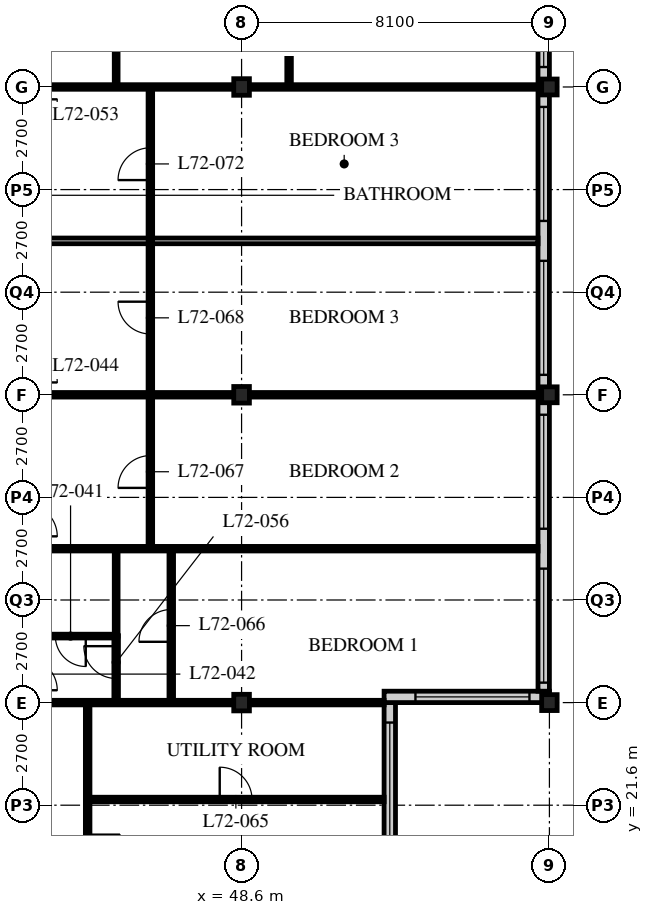
"""IFC4 building model, lengths in metres.
Left out: names, types, materials, properties, quantities, classifications, styles, units other than length and angle.
Written with IfcOpenShell. Run it as: python <this file> out.ifc"""

import sys

from ifc_helpers import new_model, si_unit, direction, frame, frame_2d, origin, origin_2d, place, context, subcontext, project, spatial, rectangle, i_section, extrude, element, fill, save


model = new_model("IFC4")
c1 = context("Model", 3, precision=1e-05, world=origin(), true_north=direction((0.0, 1.0)))
c2 = subcontext(c1, "Body", "Model", "MODEL_VIEW")
j1 = project(units=[si_unit("LENGTHUNIT", "METRE"), si_unit("PLANEANGLEUNIT", "RADIAN")], contexts=[c1])
p1 = place(None, origin())
s1 = spatial("IfcSite", under=j1, at=p1, CompositionType="ELEMENT")
p2 = place(p1, origin())
s2 = spatial("IfcBuilding", under=s1, at=p2, CompositionType="ELEMENT")
p3 = place(p2, frame((0.0, 0.0, 281.4)))
s3 = spatial("IfcBuildingStorey", under=s2, at=p3, CompositionType="ELEMENT", Elevation=281.4)
for number, where, z_axis, x_axis in (
    (1, (48.6, 24.3, 0.0), (0.0, 0.0, 1.0), (1.0, 0.0, 0.0)),
    (2, (48.6, 32.4, 0.0), (0.0, 0.0, 1.0), (1.0, 0.0, 0.0)),
    (3, (48.6, 40.5, 0.0), (0.0, 0.0, 1.0), (1.0, 0.0, 0.0)),
):
    element("IfcColumn", number, at=place(p3, frame(where, z_axis=z_axis, x_axis=x_axis)), inside=s3, PredefinedType="COLUMN", context=c2, shape_type="SweptSolid", body=[
        extrude(i_section(OverallWidth=0.412, OverallDepth=0.437, WebThickness=0.036, FlangeThickness=0.058, FilletRadius=0.015, at=origin_2d()), origin(), (0.0, 0.0, 1.0), 3.9),
    ])
for number, where, z_axis, x_axis in (
    (4, (56.7, 24.3, 0.0), (0.0, 0.0, 1.0), (1.0, 0.0, 0.0)),
    (5, (56.7, 32.4, 0.0), (0.0, 0.0, 1.0), (1.0, 0.0, 0.0)),
    (6, (56.7, 40.5, 0.0), (0.0, 0.0, 1.0), (1.0, 0.0, 0.0)),
):
    element("IfcColumn", number, at=place(p3, frame(where, z_axis=z_axis, x_axis=x_axis)), inside=s3, PredefinedType="COLUMN", context=c2, shape_type="SweptSolid", body=[
        extrude(i_section(OverallWidth=0.407, OverallDepth=0.419, WebThickness=0.031, FlangeThickness=0.049, FilletRadius=0.015, at=origin_2d()), origin(), (0.0, 0.0, 1.0), 3.9),
    ])
p4 = place(p3, frame((52.5, 20.55, 0.0), z_axis=(0.0, 0.0, 1.0), x_axis=(0.0, 1.0, 0.0)))
e7 = element("IfcWall", 7, at=p4, inside=s3, PredefinedType="SOLIDWALL", context=c2, shape_type="SweptSolid", body=[
    extrude(rectangle(XDim=3.75, YDim=0.3, at=frame_2d((1.875, 0.0))), origin(), (0.0, 0.0, 1.0), 3.69),
])
p5 = place(p4, frame((0.225, 0.0, 0.6)))
e8 = element("IfcOpeningElement", 8, at=p5, cuts=e7, PredefinedType="OPENING", context=c2, shape_type="SweptSolid", body=[
    extrude(rectangle(XDim=3.0, YDim=2.3, at=frame_2d((1.5, 1.15))), frame((0.0, 0.16, 0.0), z_axis=(0.0, -1.0, 0.0), x_axis=(1.0, 0.0, 0.0)), (0.0, 0.0, 1.0), 0.32),
])
p6 = place(p3, frame((52.35, 24.45, 0.0), z_axis=(0.0, 0.0, 1.0), x_axis=(1.0, 0.0, 0.0)))
e9 = element("IfcWall", 9, at=p6, inside=s3, PredefinedType="SOLIDWALL", context=c2, shape_type="SweptSolid", body=[
    extrude(rectangle(XDim=4.35, YDim=0.3, at=frame_2d((2.175, 0.0))), origin(), (0.0, 0.0, 1.0), 3.69),
])
p7 = place(p6, frame((0.825, 0.0, 0.6)))
e10 = element("IfcOpeningElement", 10, at=p7, cuts=e9, PredefinedType="OPENING", context=c2, shape_type="SweptSolid", body=[
    extrude(rectangle(XDim=3.0, YDim=2.3, at=frame_2d((1.5, 1.15))), frame((0.0, 0.16, 0.0), z_axis=(0.0, -1.0, 0.0), x_axis=(1.0, 0.0, 0.0)), (0.0, 0.0, 1.0), 0.32),
])
p8 = place(p3, frame((56.55, 24.6, 0.0), z_axis=(0.0, 0.0, 1.0), x_axis=(0.0, 1.0, 0.0)))
e11 = element("IfcWall", 11, at=p8, inside=s3, PredefinedType="SOLIDWALL", context=c2, shape_type="SweptSolid", body=[
    extrude(rectangle(XDim=32.1, YDim=0.3, at=frame_2d((16.05, 0.0))), origin(), (0.0, 0.0, 1.0), 3.69),
])
p9 = place(p8, frame((0.225, 0.0, 0.6)))
e12 = element("IfcOpeningElement", 12, at=p9, cuts=e11, PredefinedType="OPENING", context=c2, shape_type="SweptSolid", body=[
    extrude(rectangle(XDim=3.0, YDim=2.4, at=frame_2d((1.5, 1.2))), frame((0.0, 0.16, 0.0), z_axis=(0.0, -1.0, 0.0), x_axis=(1.0, 0.0, 0.0)), (0.0, 0.0, 1.0), 0.32),
])
p10 = place(p8, frame((4.275, 0.0, 0.6)))
e13 = element("IfcOpeningElement", 13, at=p10, cuts=e11, PredefinedType="OPENING", context=c2, shape_type="SweptSolid", body=[
    extrude(rectangle(XDim=3.0, YDim=2.4, at=frame_2d((1.5, 1.2))), frame((0.0, 0.16, 0.0), z_axis=(0.0, -1.0, 0.0), x_axis=(1.0, 0.0, 0.0)), (0.0, 0.0, 1.0), 0.32),
])
p11 = place(p8, frame((8.325, 0.0, 0.6)))
e14 = element("IfcOpeningElement", 14, at=p11, cuts=e11, PredefinedType="OPENING", context=c2, shape_type="SweptSolid", body=[
    extrude(rectangle(XDim=3.0, YDim=2.4, at=frame_2d((1.5, 1.2))), frame((0.0, 0.16, 0.0), z_axis=(0.0, -1.0, 0.0), x_axis=(1.0, 0.0, 0.0)), (0.0, 0.0, 1.0), 0.32),
])
p12 = place(p8, frame((12.375, 0.0, 0.6)))
e15 = element("IfcOpeningElement", 15, at=p12, cuts=e11, PredefinedType="OPENING", context=c2, shape_type="SweptSolid", body=[
    extrude(rectangle(XDim=3.0, YDim=2.4, at=frame_2d((1.5, 1.2))), frame((0.0, 0.16, 0.0), z_axis=(0.0, -1.0, 0.0), x_axis=(1.0, 0.0, 0.0)), (0.0, 0.0, 1.0), 0.32),
])
p13 = place(p8, frame((16.425, 0.0, 0.6)))
e16 = element("IfcOpeningElement", 16, at=p13, cuts=e11, PredefinedType="OPENING", context=c2, shape_type="SweptSolid", body=[
    extrude(rectangle(XDim=3.0, YDim=2.4, at=frame_2d((1.5, 1.2))), frame((0.0, 0.16, 0.0), z_axis=(0.0, -1.0, 0.0), x_axis=(1.0, 0.0, 0.0)), (0.0, 0.0, 1.0), 0.32),
])
p14 = place(p8, frame((20.475, 0.0, 0.6)))
e17 = element("IfcOpeningElement", 17, at=p14, cuts=e11, PredefinedType="OPENING", context=c2, shape_type="SweptSolid", body=[
    extrude(rectangle(XDim=3.0, YDim=2.4, at=frame_2d((1.5, 1.2))), frame((0.0, 0.16, 0.0), z_axis=(0.0, -1.0, 0.0), x_axis=(1.0, 0.0, 0.0)), (0.0, 0.0, 1.0), 0.32),
])
p15 = place(p8, frame((24.525, 0.0, 0.6)))
e18 = element("IfcOpeningElement", 18, at=p15, cuts=e11, PredefinedType="OPENING", context=c2, shape_type="SweptSolid", body=[
    extrude(rectangle(XDim=3.0, YDim=2.4, at=frame_2d((1.5, 1.2))), frame((0.0, 0.16, 0.0), z_axis=(0.0, -1.0, 0.0), x_axis=(1.0, 0.0, 0.0)), (0.0, 0.0, 1.0), 0.32),
])
p16 = place(p8, frame((28.575, 0.0, 0.6)))
e19 = element("IfcOpeningElement", 19, at=p16, cuts=e11, PredefinedType="OPENING", context=c2, shape_type="SweptSolid", body=[
    extrude(rectangle(XDim=3.0, YDim=2.4, at=frame_2d((1.5, 1.2))), frame((0.0, 0.16, 0.0), z_axis=(0.0, -1.0, 0.0), x_axis=(1.0, 0.0, 0.0)), (0.0, 0.0, 1.0), 0.32),
])
p17 = place(p3, frame((42.9, 24.3, 0.0), z_axis=(0.0, 0.0, 1.0), x_axis=(1.0, 0.0, 0.0)))
e20 = element("IfcWall", 20, at=p17, inside=s3, PredefinedType="PARTITIONING", context=c2, shape_type="SweptSolid", body=[
    extrude(rectangle(XDim=9.45, YDim=0.12, at=frame_2d((4.725, 0.0))), origin(), (0.0, 0.0, 1.0), 3.078),
])
p18 = place(p3, frame((40.5, 36.45, 0.0), z_axis=(0.0, 0.0, 1.0), x_axis=(1.0, 0.0, 0.0)))
e21 = element("IfcWall", 21, at=p18, inside=s3, PredefinedType="PARTITIONING", context=c2, shape_type="SweptSolid", body=[
    extrude(rectangle(XDim=15.9, YDim=0.15, at=frame_2d((7.95, 0.0))), origin(), (0.0, 0.0, 1.0), 3.69),
])
p19 = place(p3, frame((44.55, 16.5, 0.0), z_axis=(0.0, 0.0, 1.0), x_axis=(0.0, 1.0, 0.0)))
e22 = element("IfcWall", 22, at=p19, inside=s3, PredefinedType="PARTITIONING", context=c2, shape_type="SweptSolid", body=[
    extrude(rectangle(XDim=7.8, YDim=0.12, at=frame_2d((3.9, 0.0))), origin(), (0.0, 0.0, 1.0), 3.69),
])
p20 = place(p19, frame((3.475, 0.0, 0.0)))
e23 = element("IfcOpeningElement", 23, at=p20, cuts=e22, PredefinedType="OPENING", context=c2, shape_type="SweptSolid", body=[
    extrude(rectangle(XDim=0.85, YDim=2.1, at=frame_2d((0.425, 1.05))), frame((0.0, 0.07, 0.0), z_axis=(0.0, -1.0, 0.0), x_axis=(1.0, 0.0, 0.0)), (0.0, 0.0, 1.0), 0.14),
])
p21 = place(p3, frame((42.9, 26.05, 0.0), z_axis=(0.0, 0.0, 1.0), x_axis=(1.0, 0.0, 0.0)))
e24 = element("IfcWall", 24, at=p21, inside=s3, PredefinedType="PARTITIONING", context=c2, shape_type="SweptSolid", body=[
    extrude(rectangle(XDim=2.4, YDim=0.1, at=frame_2d((1.2, 0.0))), origin(), (0.0, 0.0, 1.0), 3.69),
])
p22 = place(p21, frame((0.8, 0.0, 0.0)))
e25 = element("IfcOpeningElement", 25, at=p22, cuts=e24, PredefinedType="OPENING", context=c2, shape_type="SweptSolid", body=[
    extrude(rectangle(XDim=0.8, YDim=2.1, at=frame_2d((0.4, 1.05))), frame((0.0, 0.06, 0.0), z_axis=(0.0, -1.0, 0.0), x_axis=(1.0, 0.0, 0.0)), (0.0, 0.0, 1.0), 0.12),
])
p23 = place(p3, frame((45.3, 26.05, 0.0), z_axis=(0.0, 0.0, 1.0), x_axis=(0.0, 1.0, 0.0)))
e26 = element("IfcWall", 26, at=p23, inside=s3, PredefinedType="PARTITIONING", context=c2, shape_type="SweptSolid", body=[
    extrude(rectangle(XDim=2.3, YDim=0.1, at=frame_2d((1.15, 0.0))), origin(), (0.0, 0.0, 1.0), 3.69),
])
p24 = place(p3, frame((42.9, 28.35, 0.0), z_axis=(0.0, 0.0, 1.0), x_axis=(1.0, 0.0, 0.0)))
e27 = element("IfcWall", 27, at=p24, inside=s3, PredefinedType="PARTITIONING", context=c2, shape_type="SweptSolid", body=[
    extrude(rectangle(XDim=13.5, YDim=0.12, at=frame_2d((6.75, 0.0))), origin(), (0.0, 0.0, 1.0), 3.69),
])
p25 = place(p3, frame((42.9, 32.4, 0.0), z_axis=(0.0, 0.0, 1.0), x_axis=(1.0, 0.0, 0.0)))
e28 = element("IfcWall", 28, at=p25, inside=s3, PredefinedType="PARTITIONING", context=c2, shape_type="SweptSolid", body=[
    extrude(rectangle(XDim=13.5, YDim=0.12, at=frame_2d((6.75, 0.0))), origin(), (0.0, 0.0, 1.0), 3.078),
])
p26 = place(p3, frame((45.3, 42.8, 0.0), z_axis=(0.0, 0.0, 1.0), x_axis=(0.0, -1.0, 0.0)))
e29 = element("IfcWall", 29, at=p26, inside=s3, PredefinedType="PARTITIONING", context=c2, shape_type="SweptSolid", body=[
    extrude(rectangle(XDim=2.3, YDim=0.1, at=frame_2d((1.15, 0.0))), origin(), (0.0, 0.0, 1.0), 3.69),
])
p27 = place(p3, frame((42.9, 40.5, 0.0), z_axis=(0.0, 0.0, 1.0), x_axis=(1.0, 0.0, 0.0)))
e30 = element("IfcWall", 30, at=p27, inside=s3, PredefinedType="PARTITIONING", context=c2, shape_type="SweptSolid", body=[
    extrude(rectangle(XDim=13.5, YDim=0.12, at=frame_2d((6.75, 0.0))), origin(), (0.0, 0.0, 1.0), 3.078),
])
p28 = place(p3, frame((45.3, 24.3, 0.0), z_axis=(0.0, 0.0, 1.0), x_axis=(0.0, 1.0, 0.0)))
e31 = element("IfcWall", 31, at=p28, inside=s3, PredefinedType="PARTITIONING", context=c2, shape_type="SweptSolid", body=[
    extrude(rectangle(XDim=1.76, YDim=0.12, at=frame_2d((0.88, 0.0))), origin(), (0.0, 0.0, 1.0), 3.69),
])
p29 = place(p28, frame((0.635, 0.0, 0.0)))
e32 = element("IfcOpeningElement", 32, at=p29, cuts=e31, PredefinedType="OPENING", context=c2, shape_type="SweptSolid", body=[
    extrude(rectangle(XDim=0.85, YDim=2.1, at=frame_2d((0.425, 1.05))), frame((0.0, 0.07, 0.0), z_axis=(0.0, -1.0, 0.0), x_axis=(1.0, 0.0, 0.0)), (0.0, 0.0, 1.0), 0.14),
])
p30 = place(p3, frame((44.55, 21.75, 0.0), z_axis=(0.0, 0.0, 1.0), x_axis=(1.0, 0.0, 0.0)))
e33 = element("IfcWall", 33, at=p30, inside=s3, PredefinedType="PARTITIONING", context=c2, shape_type="SweptSolid", body=[
    extrude(rectangle(XDim=7.8, YDim=0.12, at=frame_2d((3.9, 0.0))), origin(), (0.0, 0.0, 1.0), 3.69),
])
p31 = place(p30, frame((3.475, 0.0, 0.0)))
e34 = element("IfcOpeningElement", 34, at=p31, cuts=e33, PredefinedType="OPENING", context=c2, shape_type="SweptSolid", body=[
    extrude(rectangle(XDim=0.85, YDim=2.1, at=frame_2d((0.425, 1.05))), frame((0.0, 0.07, 0.0), z_axis=(0.0, -1.0, 0.0), x_axis=(1.0, 0.0, 0.0)), (0.0, 0.0, 1.0), 0.14),
])
p32 = place(p3, frame((46.75, 24.3, 0.0), z_axis=(0.0, 0.0, 1.0), x_axis=(0.0, 1.0, 0.0)))
e35 = element("IfcWall", 35, at=p32, inside=s3, PredefinedType="PARTITIONING", context=c2, shape_type="SweptSolid", body=[
    extrude(rectangle(XDim=4.05, YDim=0.12, at=frame_2d((2.025, 0.0))), origin(), (0.0, 0.0, 1.0), 3.69),
])
p33 = place(p32, frame((1.6, 0.0, 0.0)))
e36 = element("IfcOpeningElement", 36, at=p33, cuts=e35, PredefinedType="OPENING", context=c2, shape_type="SweptSolid", body=[
    extrude(rectangle(XDim=0.85, YDim=2.1, at=frame_2d((0.425, 1.05))), frame((0.0, 0.07, 0.0), z_axis=(0.0, -1.0, 0.0), x_axis=(1.0, 0.0, 0.0)), (0.0, 0.0, 1.0), 0.14),
])
p34 = place(p3, frame((46.2, 28.35, 0.0), z_axis=(0.0, 0.0, 1.0), x_axis=(0.0, 1.0, 0.0)))
e37 = element("IfcWall", 37, at=p34, inside=s3, PredefinedType="PARTITIONING", context=c2, shape_type="SweptSolid", body=[
    extrude(rectangle(XDim=12.15, YDim=0.12, at=frame_2d((6.075, 0.0))), origin(), (0.0, 0.0, 1.0), 3.69),
])
p35 = place(p34, frame((1.6, 0.0, 0.0)))
e38 = element("IfcOpeningElement", 38, at=p35, cuts=e37, PredefinedType="OPENING", context=c2, shape_type="SweptSolid", body=[
    extrude(rectangle(XDim=0.85, YDim=2.1, at=frame_2d((0.425, 1.05))), frame((0.0, 0.07, 0.0), z_axis=(0.0, -1.0, 0.0), x_axis=(1.0, 0.0, 0.0)), (0.0, 0.0, 1.0), 0.14),
])
p36 = place(p34, frame((5.65, 0.0, 0.0)))
e39 = element("IfcOpeningElement", 39, at=p36, cuts=e37, PredefinedType="OPENING", context=c2, shape_type="SweptSolid", body=[
    extrude(rectangle(XDim=0.85, YDim=2.1, at=frame_2d((0.425, 1.05))), frame((0.0, 0.07, 0.0), z_axis=(0.0, -1.0, 0.0), x_axis=(1.0, 0.0, 0.0)), (0.0, 0.0, 1.0), 0.14),
])
p37 = place(p34, frame((9.7, 0.0, 0.0)))
e40 = element("IfcOpeningElement", 40, at=p37, cuts=e37, PredefinedType="OPENING", context=c2, shape_type="SweptSolid", body=[
    extrude(rectangle(XDim=0.85, YDim=2.1, at=frame_2d((0.425, 1.05))), frame((0.0, 0.07, 0.0), z_axis=(0.0, -1.0, 0.0), x_axis=(1.0, 0.0, 0.0)), (0.0, 0.0, 1.0), 0.14),
])
p38 = place(p3, frame((49.85, 40.5, 0.0), z_axis=(0.0, 0.0, 1.0), x_axis=(0.0, 1.0, 0.0)))
e41 = element("IfcWall", 41, at=p38, inside=s3, PredefinedType="PARTITIONING", context=c2, shape_type="SweptSolid", body=[
    extrude(rectangle(XDim=6.3, YDim=0.12, at=frame_2d((3.15, 0.0))), origin(), (0.0, 0.0, 1.0), 3.69),
])
p39 = place(p38, frame((2.725, 0.0, 0.0)))
e42 = element("IfcOpeningElement", 42, at=p39, cuts=e41, PredefinedType="OPENING", context=c2, shape_type="SweptSolid", body=[
    extrude(rectangle(XDim=0.85, YDim=2.1, at=frame_2d((0.425, 1.05))), frame((0.0, 0.07, 0.0), z_axis=(0.0, -1.0, 0.0), x_axis=(1.0, 0.0, 0.0)), (0.0, 0.0, 1.0), 0.14),
])
p40 = place(p5, origin())
e43 = element("IfcWindow", 43, at=p40, inside=s3, PartitioningType="SINGLE_PANEL", PredefinedType="WINDOW", context=c2, shape_type="SweptSolid", body=[
    extrude(rectangle(XDim=3.0, YDim=2.3, at=frame_2d((1.5, 1.15))), frame((0.0, 0.03, 0.0), z_axis=(0.0, -1.0, 0.0), x_axis=(1.0, 0.0, 0.0)), (0.0, 0.0, 1.0), 0.06),
])
fill(e8, e43)
p41 = place(p7, origin())
e44 = element("IfcWindow", 44, at=p41, inside=s3, PartitioningType="SINGLE_PANEL", PredefinedType="WINDOW", context=c2, shape_type="SweptSolid", body=[
    extrude(rectangle(XDim=3.0, YDim=2.3, at=frame_2d((1.5, 1.15))), frame((0.0, 0.03, 0.0), z_axis=(0.0, -1.0, 0.0), x_axis=(1.0, 0.0, 0.0)), (0.0, 0.0, 1.0), 0.06),
])
fill(e10, e44)
p42 = place(p9, origin())
e45 = element("IfcWindow", 45, at=p42, inside=s3, PartitioningType="SINGLE_PANEL", PredefinedType="WINDOW", context=c2, shape_type="SweptSolid", body=[
    extrude(rectangle(XDim=3.0, YDim=2.4, at=frame_2d((1.5, 1.2))), frame((0.0, 0.03, 0.0), z_axis=(0.0, -1.0, 0.0), x_axis=(1.0, 0.0, 0.0)), (0.0, 0.0, 1.0), 0.06),
])
fill(e12, e45)
p43 = place(p10, origin())
e46 = element("IfcWindow", 46, at=p43, inside=s3, PartitioningType="SINGLE_PANEL", PredefinedType="WINDOW", context=c2, shape_type="SweptSolid", body=[
    extrude(rectangle(XDim=3.0, YDim=2.4, at=frame_2d((1.5, 1.2))), frame((0.0, 0.03, 0.0), z_axis=(0.0, -1.0, 0.0), x_axis=(1.0, 0.0, 0.0)), (0.0, 0.0, 1.0), 0.06),
])
fill(e13, e46)
p44 = place(p11, origin())
e47 = element("IfcWindow", 47, at=p44, inside=s3, PartitioningType="SINGLE_PANEL", PredefinedType="WINDOW", context=c2, shape_type="SweptSolid", body=[
    extrude(rectangle(XDim=3.0, YDim=2.4, at=frame_2d((1.5, 1.2))), frame((0.0, 0.03, 0.0), z_axis=(0.0, -1.0, 0.0), x_axis=(1.0, 0.0, 0.0)), (0.0, 0.0, 1.0), 0.06),
])
fill(e14, e47)
p45 = place(p12, origin())
e48 = element("IfcWindow", 48, at=p45, inside=s3, PartitioningType="SINGLE_PANEL", PredefinedType="WINDOW", context=c2, shape_type="SweptSolid", body=[
    extrude(rectangle(XDim=3.0, YDim=2.4, at=frame_2d((1.5, 1.2))), frame((0.0, 0.03, 0.0), z_axis=(0.0, -1.0, 0.0), x_axis=(1.0, 0.0, 0.0)), (0.0, 0.0, 1.0), 0.06),
])
fill(e15, e48)
p46 = place(p13, origin())
e49 = element("IfcWindow", 49, at=p46, inside=s3, PartitioningType="SINGLE_PANEL", PredefinedType="WINDOW", context=c2, shape_type="SweptSolid", body=[
    extrude(rectangle(XDim=3.0, YDim=2.4, at=frame_2d((1.5, 1.2))), frame((0.0, 0.03, 0.0), z_axis=(0.0, -1.0, 0.0), x_axis=(1.0, 0.0, 0.0)), (0.0, 0.0, 1.0), 0.06),
])
fill(e16, e49)
p47 = place(p20, origin())
e50 = element("IfcDoor", 50, at=p47, inside=s3, OperationType="SINGLE_SWING_LEFT", PredefinedType="DOOR", context=c2, shape_type="SweptSolid", body=[
    extrude(rectangle(XDim=0.85, YDim=2.1, at=frame_2d((0.425, 1.05))), frame((0.0, 0.025, 0.0), z_axis=(0.0, -1.0, 0.0), x_axis=(1.0, 0.0, 0.0)), (0.0, 0.0, 1.0), 0.05),
])
fill(e23, e50)
p48 = place(p22, origin())
e51 = element("IfcDoor", 51, at=p48, inside=s3, OperationType="SINGLE_SWING_LEFT", PredefinedType="DOOR", context=c2, shape_type="SweptSolid", body=[
    extrude(rectangle(XDim=0.8, YDim=2.1, at=frame_2d((0.4, 1.05))), frame((0.0, 0.025, 0.0), z_axis=(0.0, -1.0, 0.0), x_axis=(1.0, 0.0, 0.0)), (0.0, 0.0, 1.0), 0.05),
])
fill(e25, e51)
p49 = place(p29, origin())
e52 = element("IfcDoor", 52, at=p49, inside=s3, OperationType="SINGLE_SWING_RIGHT", PredefinedType="DOOR", context=c2, shape_type="SweptSolid", body=[
    extrude(rectangle(XDim=0.85, YDim=2.1, at=frame_2d((0.425, 1.05))), frame((0.0, 0.025, 0.0), z_axis=(0.0, -1.0, 0.0), x_axis=(1.0, 0.0, 0.0)), (0.0, 0.0, 1.0), 0.05),
])
fill(e32, e52)
p50 = place(p31, origin())
e53 = element("IfcDoor", 53, at=p50, inside=s3, OperationType="SINGLE_SWING_LEFT", PredefinedType="DOOR", context=c2, shape_type="SweptSolid", body=[
    extrude(rectangle(XDim=0.85, YDim=2.1, at=frame_2d((0.425, 1.05))), frame((0.0, 0.025, 0.0), z_axis=(0.0, -1.0, 0.0), x_axis=(1.0, 0.0, 0.0)), (0.0, 0.0, 1.0), 0.05),
])
fill(e34, e53)
p51 = place(p33, origin())
e54 = element("IfcDoor", 54, at=p51, inside=s3, OperationType="SINGLE_SWING_LEFT", PredefinedType="DOOR", context=c2, shape_type="SweptSolid", body=[
    extrude(rectangle(XDim=0.85, YDim=2.1, at=frame_2d((0.425, 1.05))), frame((0.0, 0.025, 0.0), z_axis=(0.0, -1.0, 0.0), x_axis=(1.0, 0.0, 0.0)), (0.0, 0.0, 1.0), 0.05),
])
fill(e36, e54)
p52 = place(p35, origin())
e55 = element("IfcDoor", 55, at=p52, inside=s3, OperationType="SINGLE_SWING_LEFT", PredefinedType="DOOR", context=c2, shape_type="SweptSolid", body=[
    extrude(rectangle(XDim=0.85, YDim=2.1, at=frame_2d((0.425, 1.05))), frame((0.0, 0.025, 0.0), z_axis=(0.0, -1.0, 0.0), x_axis=(1.0, 0.0, 0.0)), (0.0, 0.0, 1.0), 0.05),
])
fill(e38, e55)
p53 = place(p36, origin())
e56 = element("IfcDoor", 56, at=p53, inside=s3, OperationType="SINGLE_SWING_RIGHT", PredefinedType="DOOR", context=c2, shape_type="SweptSolid", body=[
    extrude(rectangle(XDim=0.85, YDim=2.1, at=frame_2d((0.425, 1.05))), frame((0.0, 0.025, 0.0), z_axis=(0.0, -1.0, 0.0), x_axis=(1.0, 0.0, 0.0)), (0.0, 0.0, 1.0), 0.05),
])
fill(e39, e56)
p54 = place(p37, origin())
e57 = element("IfcDoor", 57, at=p54, inside=s3, OperationType="SINGLE_SWING_LEFT", PredefinedType="DOOR", context=c2, shape_type="SweptSolid", body=[
    extrude(rectangle(XDim=0.85, YDim=2.1, at=frame_2d((0.425, 1.05))), frame((0.0, 0.025, 0.0), z_axis=(0.0, -1.0, 0.0), x_axis=(1.0, 0.0, 0.0)), (0.0, 0.0, 1.0), 0.05),
])
fill(e40, e57)
save(model, sys.argv[1])
